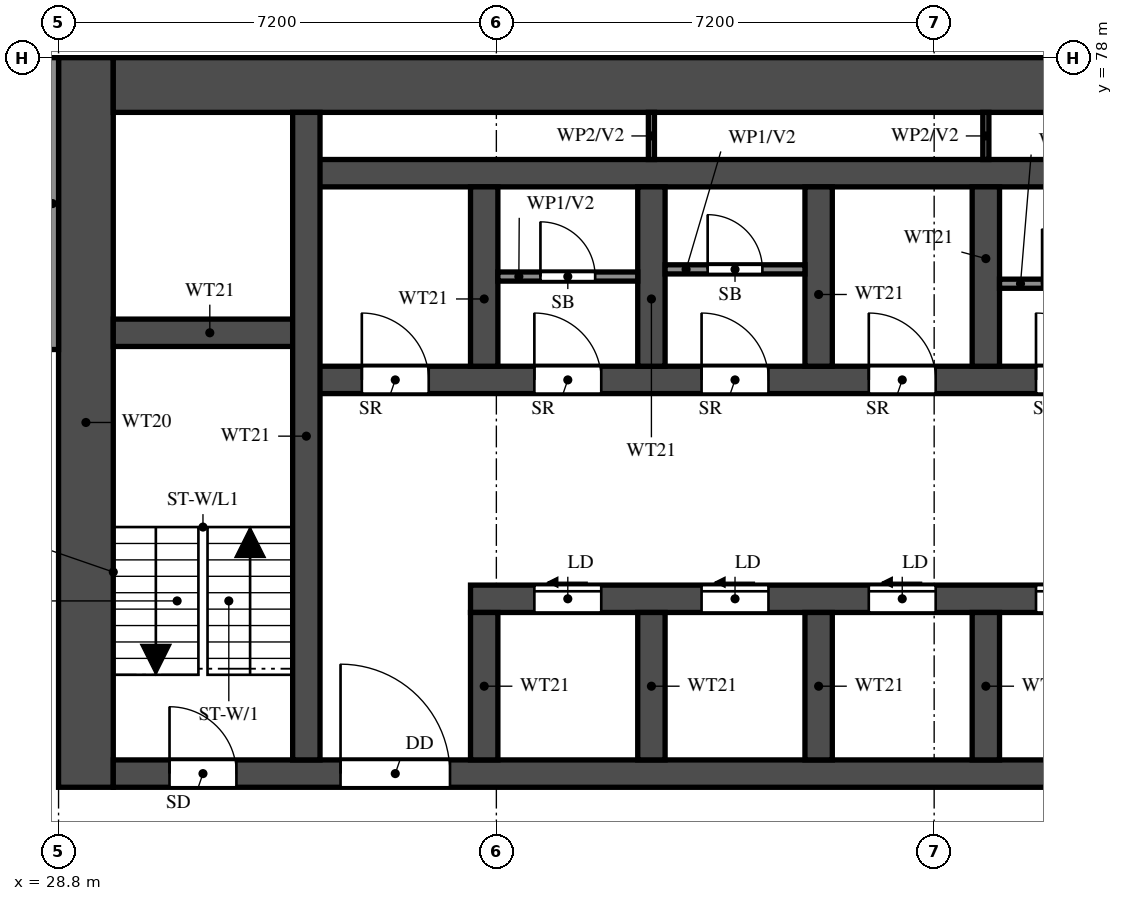
"""IFC4 building model, lengths in metres.
Left out: names, types, materials, properties, quantities, classifications, styles, units other than length and angle.
Written with IfcOpenShell. Run it as: python <this file> out.ifc"""

import sys

from ifc_helpers import new_model, si_unit, direction, frame, frame_2d, origin, place, context, subcontext, project, spatial, rectangle, extrude, element, fill, save


model = new_model("IFC4")
c1 = context("Model", 3, precision=1e-05, world=origin(), true_north=direction((0.0, 1.0)))
c2 = subcontext(c1, "Body", "Model", "MODEL_VIEW")
j1 = project(units=[si_unit("LENGTHUNIT", "METRE"), si_unit("PLANEANGLEUNIT", "RADIAN")], contexts=[c1])
p1 = place(None, origin())
s1 = spatial("IfcSite", under=j1, at=p1, CompositionType="ELEMENT")
p2 = place(p1, origin())
s2 = spatial("IfcBuilding", under=s1, at=p2, CompositionType="ELEMENT")
p3 = place(p2, frame((0.0, 0.0, 83.0)))
s3 = spatial("IfcBuildingStorey", under=s2, at=p3, CompositionType="ELEMENT", Elevation=83.0)
p4 = place(p3, frame((29.25, 66.0, 0.0), z_axis=(0.0, 0.0, 1.0), x_axis=(0.0, 1.0, 0.0)))
e1 = element("IfcWall", 1, at=p4, inside=s3, PredefinedType="SHEAR", context=c2, shape_type="SweptSolid", body=[
    extrude(rectangle(XDim=12.0, YDim=0.9, at=frame_2d((6.0, 0.0))), origin(), (0.0, 0.0, 1.0), 3.18),
])
p5 = place(p3, frame((29.7, 77.55, 0.0), z_axis=(0.0, 0.0, 1.0), x_axis=(1.0, 0.0, 0.0)))
e2 = element("IfcWall", 2, at=p5, inside=s3, PredefinedType="SHEAR", context=c2, shape_type="SweptSolid", body=[
    extrude(rectangle(XDim=41.4, YDim=0.9, at=frame_2d((20.7, 0.0))), origin(), (0.0, 0.0, 1.0), 3.18),
])
p6 = place(p3, frame((29.7, 66.225, 0.0), z_axis=(0.0, 0.0, 1.0), x_axis=(1.0, 0.0, 0.0)))
e3 = element("IfcWall", 3, at=p6, inside=s3, PredefinedType="SHEAR", context=c2, shape_type="SweptSolid", body=[
    extrude(rectangle(XDim=41.4, YDim=0.45, at=frame_2d((20.7, 0.0))), origin(), (0.0, 0.0, 1.0), 3.18),
])
p7 = place(p6, frame((0.925, 0.0, 0.0)))
e4 = element("IfcOpeningElement", 4, at=p7, cuts=e3, PredefinedType="OPENING", context=c2, shape_type="SweptSolid", body=[
    extrude(rectangle(XDim=1.1, YDim=2.1, at=frame_2d((0.55, 1.05))), frame((0.0, 0.235, 0.0), z_axis=(0.0, -1.0, 0.0), x_axis=(1.0, 0.0, 0.0)), (0.0, 0.0, 1.0), 0.47),
])
p8 = place(p6, frame((3.738, 0.0, 0.0)))
e5 = element("IfcOpeningElement", 5, at=p8, cuts=e3, PredefinedType="OPENING", context=c2, shape_type="SweptSolid", body=[
    extrude(rectangle(XDim=1.8, YDim=2.1, at=frame_2d((0.9, 1.05))), frame((0.0, 0.235, 0.0), z_axis=(0.0, -1.0, 0.0), x_axis=(1.0, 0.0, 0.0)), (0.0, 0.0, 1.0), 0.47),
])
p9 = place(p3, frame((35.575, 69.1, 0.0), z_axis=(0.0, 0.0, 1.0), x_axis=(1.0, 0.0, 0.0)))
e6 = element("IfcWall", 6, at=p9, inside=s3, PredefinedType="SHEAR", context=c2, shape_type="SweptSolid", body=[
    extrude(rectangle(XDim=24.2, YDim=0.45, at=frame_2d((12.1, 0.0))), origin(), (0.0, 0.0, 1.0), 3.18),
])
p10 = place(p9, frame((1.05, 0.0, 0.0)))
e7 = element("IfcOpeningElement", 7, at=p10, cuts=e6, PredefinedType="OPENING", context=c2, shape_type="SweptSolid", body=[
    extrude(rectangle(XDim=1.1, YDim=2.1, at=frame_2d((0.55, 1.05))), frame((0.0, 0.235, 0.0), z_axis=(0.0, -1.0, 0.0), x_axis=(1.0, 0.0, 0.0)), (0.0, 0.0, 1.0), 0.47),
])
p11 = place(p9, frame((3.8, 0.0, 0.0)))
e8 = element("IfcOpeningElement", 8, at=p11, cuts=e6, PredefinedType="OPENING", context=c2, shape_type="SweptSolid", body=[
    extrude(rectangle(XDim=1.1, YDim=2.1, at=frame_2d((0.55, 1.05))), frame((0.0, 0.235, 0.0), z_axis=(0.0, -1.0, 0.0), x_axis=(1.0, 0.0, 0.0)), (0.0, 0.0, 1.0), 0.47),
])
p12 = place(p9, frame((6.55, 0.0, 0.0)))
e9 = element("IfcOpeningElement", 9, at=p12, cuts=e6, PredefinedType="OPENING", context=c2, shape_type="SweptSolid", body=[
    extrude(rectangle(XDim=1.1, YDim=2.1, at=frame_2d((0.55, 1.05))), frame((0.0, 0.235, 0.0), z_axis=(0.0, -1.0, 0.0), x_axis=(1.0, 0.0, 0.0)), (0.0, 0.0, 1.0), 0.47),
])
p13 = place(p9, frame((9.3, 0.0, 0.0)))
e10 = element("IfcOpeningElement", 10, at=p13, cuts=e6, PredefinedType="OPENING", context=c2, shape_type="SweptSolid", body=[
    extrude(rectangle(XDim=1.1, YDim=2.1, at=frame_2d((0.55, 1.05))), frame((0.0, 0.235, 0.0), z_axis=(0.0, -1.0, 0.0), x_axis=(1.0, 0.0, 0.0)), (0.0, 0.0, 1.0), 0.47),
])
p14 = place(p9, frame((12.05, 0.0, 0.0)))
e11 = element("IfcOpeningElement", 11, at=p14, cuts=e6, PredefinedType="OPENING", context=c2, shape_type="SweptSolid", body=[
    extrude(rectangle(XDim=1.1, YDim=2.1, at=frame_2d((0.55, 1.05))), frame((0.0, 0.235, 0.0), z_axis=(0.0, -1.0, 0.0), x_axis=(1.0, 0.0, 0.0)), (0.0, 0.0, 1.0), 0.47),
])
p15 = place(p9, frame((14.8, 0.0, 0.0)))
e12 = element("IfcOpeningElement", 12, at=p15, cuts=e6, PredefinedType="OPENING", context=c2, shape_type="SweptSolid", body=[
    extrude(rectangle(XDim=1.1, YDim=2.1, at=frame_2d((0.55, 1.05))), frame((0.0, 0.235, 0.0), z_axis=(0.0, -1.0, 0.0), x_axis=(1.0, 0.0, 0.0)), (0.0, 0.0, 1.0), 0.47),
])
p16 = place(p3, frame((32.875, 72.7, 0.0), z_axis=(0.0, 0.0, 1.0), x_axis=(1.0, 0.0, 0.0)))
e13 = element("IfcWall", 13, at=p16, inside=s3, PredefinedType="SHEAR", context=c2, shape_type="SweptSolid", body=[
    extrude(rectangle(XDim=35.05, YDim=0.45, at=frame_2d((17.525, 0.0))), origin(), (0.0, 0.0, 1.0), 3.18),
])
p17 = place(p16, frame((19.8, 0.0, 0.0)))
e14 = element("IfcOpeningElement", 14, at=p17, cuts=e13, PredefinedType="OPENING", context=c2, shape_type="SweptSolid", body=[
    extrude(rectangle(XDim=1.1, YDim=2.1, at=frame_2d((0.55, 1.05))), frame((0.0, 0.235, 0.0), z_axis=(0.0, -1.0, 0.0), x_axis=(1.0, 0.0, 0.0)), (0.0, 0.0, 1.0), 0.47),
])
p18 = place(p16, frame((27.65, 0.0, 0.0)))
e15 = element("IfcOpeningElement", 15, at=p18, cuts=e13, PredefinedType="OPENING", context=c2, shape_type="SweptSolid", body=[
    extrude(rectangle(XDim=1.1, YDim=2.1, at=frame_2d((0.55, 1.05))), frame((0.0, 0.235, 0.0), z_axis=(0.0, -1.0, 0.0), x_axis=(1.0, 0.0, 0.0)), (0.0, 0.0, 1.0), 0.47),
])
p19 = place(p16, frame((30.25, 0.0, 0.0)))
e16 = element("IfcOpeningElement", 16, at=p19, cuts=e13, PredefinedType="OPENING", context=c2, shape_type="SweptSolid", body=[
    extrude(rectangle(XDim=1.1, YDim=2.1, at=frame_2d((0.55, 1.05))), frame((0.0, 0.235, 0.0), z_axis=(0.0, -1.0, 0.0), x_axis=(1.0, 0.0, 0.0)), (0.0, 0.0, 1.0), 0.47),
])
p20 = place(p16, frame((3.75, 0.0, 0.0)))
e17 = element("IfcOpeningElement", 17, at=p20, cuts=e13, PredefinedType="OPENING", context=c2, shape_type="SweptSolid", body=[
    extrude(rectangle(XDim=1.1, YDim=2.1, at=frame_2d((0.55, 1.05))), frame((0.0, 0.235, 0.0), z_axis=(0.0, -1.0, 0.0), x_axis=(1.0, 0.0, 0.0)), (0.0, 0.0, 1.0), 0.47),
])
p21 = place(p16, frame((6.5, 0.0, 0.0)))
e18 = element("IfcOpeningElement", 18, at=p21, cuts=e13, PredefinedType="OPENING", context=c2, shape_type="SweptSolid", body=[
    extrude(rectangle(XDim=1.1, YDim=2.1, at=frame_2d((0.55, 1.05))), frame((0.0, 0.235, 0.0), z_axis=(0.0, -1.0, 0.0), x_axis=(1.0, 0.0, 0.0)), (0.0, 0.0, 1.0), 0.47),
])
p22 = place(p16, frame((9.25, 0.0, 0.0)))
e19 = element("IfcOpeningElement", 19, at=p22, cuts=e13, PredefinedType="OPENING", context=c2, shape_type="SweptSolid", body=[
    extrude(rectangle(XDim=1.1, YDim=2.1, at=frame_2d((0.55, 1.05))), frame((0.0, 0.235, 0.0), z_axis=(0.0, -1.0, 0.0), x_axis=(1.0, 0.0, 0.0)), (0.0, 0.0, 1.0), 0.47),
])
p23 = place(p16, frame((12.0, 0.0, 0.0)))
e20 = element("IfcOpeningElement", 20, at=p23, cuts=e13, PredefinedType="OPENING", context=c2, shape_type="SweptSolid", body=[
    extrude(rectangle(XDim=1.1, YDim=2.1, at=frame_2d((0.55, 1.05))), frame((0.0, 0.235, 0.0), z_axis=(0.0, -1.0, 0.0), x_axis=(1.0, 0.0, 0.0)), (0.0, 0.0, 1.0), 0.47),
])
p24 = place(p16, frame((14.75, 0.0, 0.0)))
e21 = element("IfcOpeningElement", 21, at=p24, cuts=e13, PredefinedType="OPENING", context=c2, shape_type="SweptSolid", body=[
    extrude(rectangle(XDim=1.1, YDim=2.1, at=frame_2d((0.55, 1.05))), frame((0.0, 0.235, 0.0), z_axis=(0.0, -1.0, 0.0), x_axis=(1.0, 0.0, 0.0)), (0.0, 0.0, 1.0), 0.47),
])
p25 = place(p16, frame((17.5, 0.0, 0.0)))
e22 = element("IfcOpeningElement", 22, at=p25, cuts=e13, PredefinedType="OPENING", context=c2, shape_type="SweptSolid", body=[
    extrude(rectangle(XDim=1.1, YDim=2.1, at=frame_2d((0.55, 1.05))), frame((0.0, 0.235, 0.0), z_axis=(0.0, -1.0, 0.0), x_axis=(1.0, 0.0, 0.0)), (0.0, 0.0, 1.0), 0.47),
])
p26 = place(p16, frame((0.913, 0.0, 0.0)))
e23 = element("IfcOpeningElement", 23, at=p26, cuts=e13, PredefinedType="OPENING", context=c2, shape_type="SweptSolid", body=[
    extrude(rectangle(XDim=1.1, YDim=2.1, at=frame_2d((0.55, 1.05))), frame((0.0, 0.235, 0.0), z_axis=(0.0, -1.0, 0.0), x_axis=(1.0, 0.0, 0.0)), (0.0, 0.0, 1.0), 0.47),
])
p27 = place(p3, frame((32.875, 76.1, 0.0), z_axis=(0.0, 0.0, 1.0), x_axis=(1.0, 0.0, 0.0)))
e24 = element("IfcWall", 24, at=p27, inside=s3, PredefinedType="SHEAR", context=c2, shape_type="SweptSolid", body=[
    extrude(rectangle(XDim=35.05, YDim=0.45, at=frame_2d((17.525, 0.0))), origin(), (0.0, 0.0, 1.0), 3.18),
])
p28 = place(p3, frame((29.7, 73.475, 0.0), z_axis=(0.0, 0.0, 1.0), x_axis=(1.0, 0.0, 0.0)))
e25 = element("IfcWall", 25, at=p28, inside=s3, PredefinedType="SHEAR", context=c2, shape_type="SweptSolid", body=[
    extrude(rectangle(XDim=3.175, YDim=0.45, at=frame_2d((1.587, 0.0))), origin(), (0.0, 0.0, 1.0), 3.18),
])
p29 = place(p3, frame((32.875, 66.45, 0.0), z_axis=(0.0, 0.0, 1.0), x_axis=(0.0, 1.0, 0.0)))
e26 = element("IfcWall", 26, at=p29, inside=s3, PredefinedType="SHEAR", context=c2, shape_type="SweptSolid", body=[
    extrude(rectangle(XDim=10.65, YDim=0.45, at=frame_2d((5.325, 0.0))), origin(), (0.0, 0.0, 1.0), 3.18),
])
for number, where, z_axis, x_axis in (
    (27, (35.8, 66.45, 0.0), (0.0, 0.0, 1.0), (0.0, 1.0, 0.0)),
    (28, (38.55, 66.45, 0.0), (0.0, 0.0, 1.0), (0.0, 1.0, 0.0)),
    (29, (41.3, 66.45, 0.0), (0.0, 0.0, 1.0), (0.0, 1.0, 0.0)),
    (30, (44.05, 66.45, 0.0), (0.0, 0.0, 1.0), (0.0, 1.0, 0.0)),
):
    element("IfcWall", number, at=place(p3, frame(where, z_axis=z_axis, x_axis=x_axis)), inside=s3, PredefinedType="SHEAR", context=c2, shape_type="SweptSolid", body=[
        extrude(rectangle(XDim=2.425, YDim=0.45, at=frame_2d((1.212, 0.0))), origin(), (0.0, 0.0, 1.0), 3.18),
    ])
for number, where, z_axis, x_axis in (
    (31, (35.8, 72.925, 0.0), (0.0, 0.0, 1.0), (0.0, 1.0, 0.0)),
    (32, (38.55, 72.925, 0.0), (0.0, 0.0, 1.0), (0.0, 1.0, 0.0)),
    (33, (41.3, 72.925, 0.0), (0.0, 0.0, 1.0), (0.0, 1.0, 0.0)),
    (34, (44.05, 72.925, 0.0), (0.0, 0.0, 1.0), (0.0, 1.0, 0.0)),
):
    element("IfcWall", number, at=place(p3, frame(where, z_axis=z_axis, x_axis=x_axis)), inside=s3, PredefinedType="SHEAR", context=c2, shape_type="SweptSolid", body=[
        extrude(rectangle(XDim=2.95, YDim=0.45, at=frame_2d((1.475, 0.0))), origin(), (0.0, 0.0, 1.0), 3.18),
    ])
p30 = place(p3, frame((36.025, 74.4, 0.0), z_axis=(0.0, 0.0, 1.0), x_axis=(1.0, 0.0, 0.0)))
e35 = element("IfcWall", 35, at=p30, inside=s3, PredefinedType="PARTITIONING", context=c2, shape_type="SweptSolid", body=[
    extrude(rectangle(XDim=2.3, YDim=0.15, at=frame_2d((1.15, 0.0))), origin(), (0.0, 0.0, 1.0), 3.18),
])
p31 = place(p30, frame((0.7, 0.0, 0.0)))
e36 = element("IfcOpeningElement", 36, at=p31, cuts=e35, PredefinedType="OPENING", context=c2, shape_type="SweptSolid", body=[
    extrude(rectangle(XDim=0.9, YDim=2.1, at=frame_2d((0.45, 1.05))), frame((0.0, 0.085, 0.0), z_axis=(0.0, -1.0, 0.0), x_axis=(1.0, 0.0, 0.0)), (0.0, 0.0, 1.0), 0.17),
])
p32 = place(p3, frame((38.775, 74.518, 0.0), z_axis=(0.0, 0.0, 1.0), x_axis=(1.0, 0.0, 0.0)))
e37 = element("IfcWall", 37, at=p32, inside=s3, PredefinedType="PARTITIONING", context=c2, shape_type="SweptSolid", body=[
    extrude(rectangle(XDim=2.3, YDim=0.15, at=frame_2d((1.15, 0.0))), origin(), (0.0, 0.0, 1.0), 3.18),
])
p33 = place(p32, frame((0.7, 0.0, 0.0)))
e38 = element("IfcOpeningElement", 38, at=p33, cuts=e37, PredefinedType="OPENING", context=c2, shape_type="SweptSolid", body=[
    extrude(rectangle(XDim=0.9, YDim=2.1, at=frame_2d((0.45, 1.05))), frame((0.0, 0.085, 0.0), z_axis=(0.0, -1.0, 0.0), x_axis=(1.0, 0.0, 0.0)), (0.0, 0.0, 1.0), 0.17),
])
p34 = place(p3, frame((44.275, 74.282, 0.0), z_axis=(0.0, 0.0, 1.0), x_axis=(1.0, 0.0, 0.0)))
e39 = element("IfcWall", 39, at=p34, inside=s3, PredefinedType="PARTITIONING", context=c2, shape_type="SweptSolid", body=[
    extrude(rectangle(XDim=2.3, YDim=0.15, at=frame_2d((1.15, 0.0))), origin(), (0.0, 0.0, 1.0), 3.18),
])
p35 = place(p34, frame((0.7, 0.0, 0.0)))
e40 = element("IfcOpeningElement", 40, at=p35, cuts=e39, PredefinedType="OPENING", context=c2, shape_type="SweptSolid", body=[
    extrude(rectangle(XDim=0.9, YDim=2.1, at=frame_2d((0.45, 1.05))), frame((0.0, 0.085, 0.0), z_axis=(0.0, -1.0, 0.0), x_axis=(1.0, 0.0, 0.0)), (0.0, 0.0, 1.0), 0.17),
])
for number, where, z_axis, x_axis in (
    (41, (38.55, 76.325, 0.0), (0.0, 0.0, 1.0), (0.0, 1.0, 0.0)),
    (42, (44.05, 76.325, 0.0), (0.0, 0.0, 1.0), (0.0, 1.0, 0.0)),
):
    element("IfcWall", number, at=place(p3, frame(where, z_axis=z_axis, x_axis=x_axis)), inside=s3, PredefinedType="PARTITIONING", context=c2, shape_type="SweptSolid", body=[
        extrude(rectangle(XDim=0.775, YDim=0.1, at=frame_2d((0.388, 0.0))), origin(), (0.0, 0.0, 1.0), 3.18),
    ])
p36 = place(p3, frame((28.7, 73.2, 0.0), z_axis=(0.0, 0.0, 1.0), x_axis=(0.0, 1.0, 0.0)))
e43 = element("IfcWall", 43, at=p36, inside=s3, PredefinedType="SOLIDWALL", context=c2, shape_type="SweptSolid", body=[
    extrude(rectangle(XDim=4.8, YDim=0.2, at=frame_2d((2.4, 0.0))), origin(), (0.0, 0.0, 1.0), 3.18),
])
p37 = place(p7, origin())
e44 = element("IfcDoor", 44, at=p37, inside=s3, OperationType="SINGLE_SWING_LEFT", PredefinedType="DOOR", context=c2, shape_type="SweptSolid", body=[
    extrude(rectangle(XDim=1.1, YDim=2.1, at=frame_2d((0.55, 1.05))), frame((0.0, 0.025, 0.0), z_axis=(0.0, -1.0, 0.0), x_axis=(1.0, 0.0, 0.0)), (0.0, 0.0, 1.0), 0.05),
])
fill(e4, e44)
p38 = place(p8, origin())
e45 = element("IfcDoor", 45, at=p38, inside=s3, OperationType="DOUBLE_DOOR_SINGLE_SWING", PredefinedType="DOOR", context=c2, shape_type="SweptSolid", body=[
    extrude(rectangle(XDim=1.8, YDim=2.1, at=frame_2d((0.9, 1.05))), frame((0.0, 0.025, 0.0), z_axis=(0.0, -1.0, 0.0), x_axis=(1.0, 0.0, 0.0)), (0.0, 0.0, 1.0), 0.05),
])
fill(e5, e45)
p39 = place(p10, origin())
e46 = element("IfcDoor", 46, at=p39, inside=s3, OperationType="SLIDING_TO_LEFT", PredefinedType="DOOR", context=c2, shape_type="SweptSolid", body=[
    extrude(rectangle(XDim=1.1, YDim=2.1, at=frame_2d((0.55, 1.05))), frame((0.0, 0.025, 0.0), z_axis=(0.0, -1.0, 0.0), x_axis=(1.0, 0.0, 0.0)), (0.0, 0.0, 1.0), 0.05),
])
fill(e7, e46)
p40 = place(p11, origin())
e47 = element("IfcDoor", 47, at=p40, inside=s3, OperationType="SLIDING_TO_LEFT", PredefinedType="DOOR", context=c2, shape_type="SweptSolid", body=[
    extrude(rectangle(XDim=1.1, YDim=2.1, at=frame_2d((0.55, 1.05))), frame((0.0, 0.025, 0.0), z_axis=(0.0, -1.0, 0.0), x_axis=(1.0, 0.0, 0.0)), (0.0, 0.0, 1.0), 0.05),
])
fill(e8, e47)
p41 = place(p12, origin())
e48 = element("IfcDoor", 48, at=p41, inside=s3, OperationType="SLIDING_TO_LEFT", PredefinedType="DOOR", context=c2, shape_type="SweptSolid", body=[
    extrude(rectangle(XDim=1.1, YDim=2.1, at=frame_2d((0.55, 1.05))), frame((0.0, 0.025, 0.0), z_axis=(0.0, -1.0, 0.0), x_axis=(1.0, 0.0, 0.0)), (0.0, 0.0, 1.0), 0.05),
])
fill(e9, e48)
p42 = place(p13, origin())
e49 = element("IfcDoor", 49, at=p42, inside=s3, OperationType="SLIDING_TO_LEFT", PredefinedType="DOOR", context=c2, shape_type="SweptSolid", body=[
    extrude(rectangle(XDim=1.1, YDim=2.1, at=frame_2d((0.55, 1.05))), frame((0.0, 0.025, 0.0), z_axis=(0.0, -1.0, 0.0), x_axis=(1.0, 0.0, 0.0)), (0.0, 0.0, 1.0), 0.05),
])
fill(e10, e49)
p43 = place(p20, origin())
e50 = element("IfcDoor", 50, at=p43, inside=s3, OperationType="SINGLE_SWING_LEFT", PredefinedType="DOOR", context=c2, shape_type="SweptSolid", body=[
    extrude(rectangle(XDim=1.1, YDim=2.1, at=frame_2d((0.55, 1.05))), frame((0.0, 0.025, 0.0), z_axis=(0.0, -1.0, 0.0), x_axis=(1.0, 0.0, 0.0)), (0.0, 0.0, 1.0), 0.05),
])
fill(e17, e50)
p44 = place(p31, origin())
e51 = element("IfcDoor", 51, at=p44, inside=s3, OperationType="SINGLE_SWING_LEFT", PredefinedType="DOOR", context=c2, shape_type="SweptSolid", body=[
    extrude(rectangle(XDim=0.9, YDim=2.1, at=frame_2d((0.45, 1.05))), frame((0.0, 0.025, 0.0), z_axis=(0.0, -1.0, 0.0), x_axis=(1.0, 0.0, 0.0)), (0.0, 0.0, 1.0), 0.05),
])
fill(e36, e51)
p45 = place(p21, origin())
e52 = element("IfcDoor", 52, at=p45, inside=s3, OperationType="SINGLE_SWING_LEFT", PredefinedType="DOOR", context=c2, shape_type="SweptSolid", body=[
    extrude(rectangle(XDim=1.1, YDim=2.1, at=frame_2d((0.55, 1.05))), frame((0.0, 0.025, 0.0), z_axis=(0.0, -1.0, 0.0), x_axis=(1.0, 0.0, 0.0)), (0.0, 0.0, 1.0), 0.05),
])
fill(e18, e52)
p46 = place(p33, origin())
e53 = element("IfcDoor", 53, at=p46, inside=s3, OperationType="SINGLE_SWING_LEFT", PredefinedType="DOOR", context=c2, shape_type="SweptSolid", body=[
    extrude(rectangle(XDim=0.9, YDim=2.1, at=frame_2d((0.45, 1.05))), frame((0.0, 0.025, 0.0), z_axis=(0.0, -1.0, 0.0), x_axis=(1.0, 0.0, 0.0)), (0.0, 0.0, 1.0), 0.05),
])
fill(e38, e53)
p47 = place(p22, origin())
e54 = element("IfcDoor", 54, at=p47, inside=s3, OperationType="SINGLE_SWING_LEFT", PredefinedType="DOOR", context=c2, shape_type="SweptSolid", body=[
    extrude(rectangle(XDim=1.1, YDim=2.1, at=frame_2d((0.55, 1.05))), frame((0.0, 0.025, 0.0), z_axis=(0.0, -1.0, 0.0), x_axis=(1.0, 0.0, 0.0)), (0.0, 0.0, 1.0), 0.05),
])
fill(e19, e54)
p48 = place(p23, origin())
e55 = element("IfcDoor", 55, at=p48, inside=s3, OperationType="SINGLE_SWING_LEFT", PredefinedType="DOOR", context=c2, shape_type="SweptSolid", body=[
    extrude(rectangle(XDim=1.1, YDim=2.1, at=frame_2d((0.55, 1.05))), frame((0.0, 0.025, 0.0), z_axis=(0.0, -1.0, 0.0), x_axis=(1.0, 0.0, 0.0)), (0.0, 0.0, 1.0), 0.05),
])
fill(e20, e55)
p49 = place(p35, origin())
e56 = element("IfcDoor", 56, at=p49, inside=s3, OperationType="SINGLE_SWING_RIGHT", PredefinedType="DOOR", context=c2, shape_type="SweptSolid", body=[
    extrude(rectangle(XDim=0.9, YDim=2.1, at=frame_2d((0.45, 1.05))), frame((0.0, 0.025, 0.0), z_axis=(0.0, -1.0, 0.0), x_axis=(1.0, 0.0, 0.0)), (0.0, 0.0, 1.0), 0.05),
])
fill(e40, e56)
p50 = place(p26, origin())
e57 = element("IfcDoor", 57, at=p50, inside=s3, OperationType="SINGLE_SWING_LEFT", PredefinedType="DOOR", context=c2, shape_type="SweptSolid", body=[
    extrude(rectangle(XDim=1.1, YDim=2.1, at=frame_2d((0.55, 1.05))), frame((0.0, 0.025, 0.0), z_axis=(0.0, -1.0, 0.0), x_axis=(1.0, 0.0, 0.0)), (0.0, 0.0, 1.0), 0.05),
])
fill(e23, e57)
save(model, sys.argv[1])
